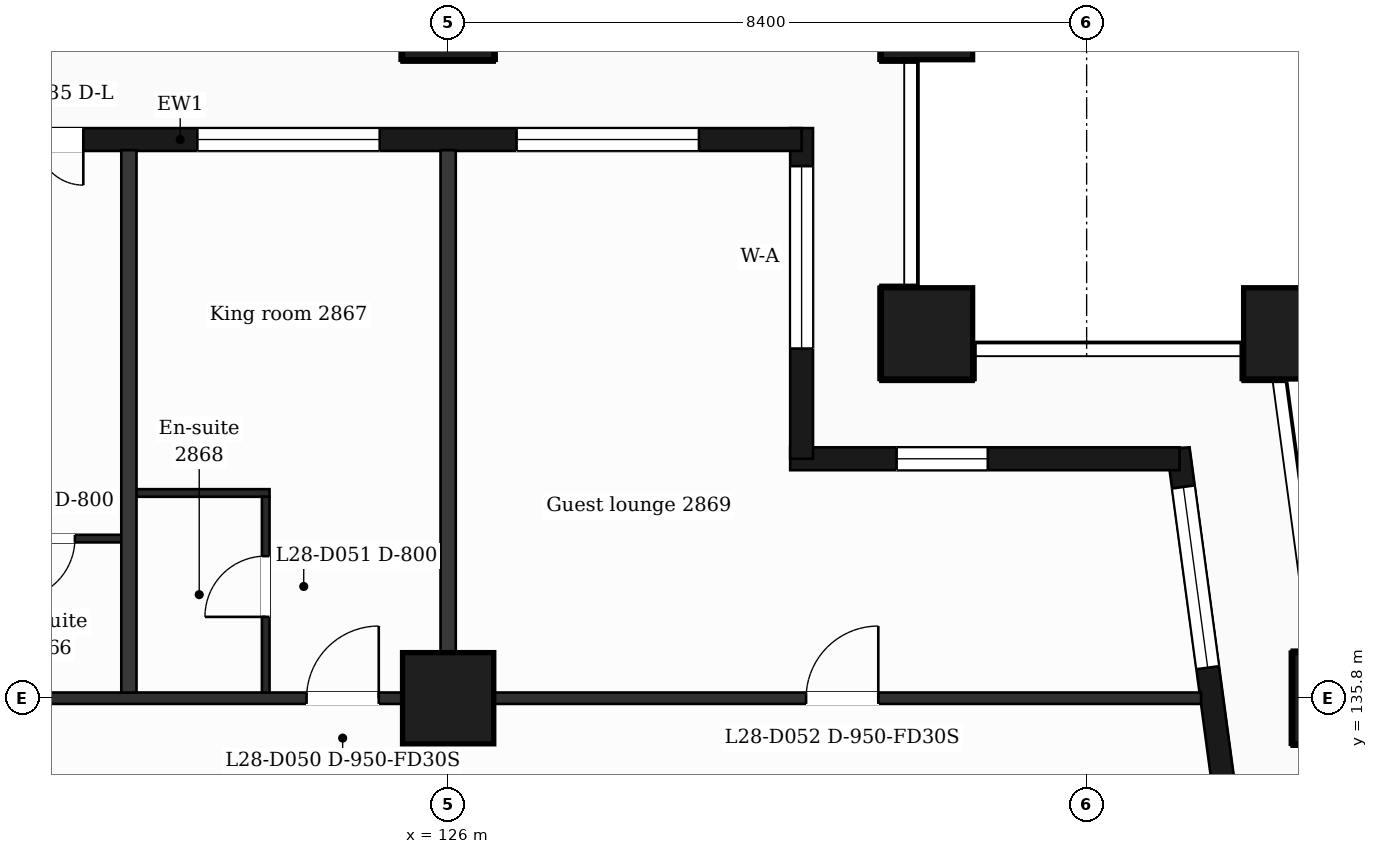
"""IFC4 building model, lengths in metres.
Left out: names, types, materials, properties, quantities, classifications, styles, units other than length and angle.
Written with IfcOpenShell. Run it as: python <this file> out.ifc"""

import sys

from ifc_helpers import new_model, si_unit, direction, frame, frame_2d, origin, origin_2d, place, context, subcontext, project, spatial, rectangle, extrude, element, fill, save


model = new_model("IFC4")
c1 = context("Model", 3, precision=1e-05, world=origin(), true_north=direction((0.0, 1.0)))
c2 = subcontext(c1, "Body", "Model", "MODEL_VIEW")
j1 = project(units=[si_unit("LENGTHUNIT", "METRE"), si_unit("PLANEANGLEUNIT", "RADIAN")], contexts=[c1])
p1 = place(None, origin())
s1 = spatial("IfcSite", under=j1, at=p1, CompositionType="ELEMENT")
p2 = place(p1, origin())
s2 = spatial("IfcBuilding", under=s1, at=p2, CompositionType="ELEMENT")
p3 = place(p2, frame((0.0, 0.0, 120.6)))
s3 = spatial("IfcBuildingStorey", under=s2, at=p3, CompositionType="ELEMENT", Elevation=120.6)
for number, where, z_axis, x_axis in (
    (1, (132.3, 140.6, 0.0), (0.0, 0.0, 1.0), (1.0, 0.0, 0.0)),
    (2, (137.065, 140.6, 0.0), (0.0, 0.0, 1.0), (1.0, 0.0, 0.0)),
    (3, (126.0, 135.8, 0.0), (0.0, 0.0, 1.0), (1.0, 0.0, 0.0)),
    (4, (137.711, 135.8, 0.0), (0.0, 0.0, 1.0), (1.0, 0.0, 0.0)),
    (5, (126.0, 144.8, 0.0), (0.0, 0.0, 1.0), (1.0, 0.0, 0.0)),
    (6, (132.3, 144.8, 0.0), (0.0, 0.0, 1.0), (1.0, 0.0, 0.0)),
):
    element("IfcColumn", number, at=place(p3, frame(where, z_axis=z_axis, x_axis=x_axis)), inside=s3, PredefinedType="COLUMN", context=c2, shape_type="SweptSolid", body=[
        extrude(rectangle(XDim=1.2, YDim=1.2, at=origin_2d()), origin(), (0.0, 0.0, 1.0), 3.7),
    ])
p4 = place(p3, frame((136.504, 132.4, 0.0), z_axis=(0.0, 0.0, 1.0), x_axis=(-0.133399697462, 0.99106231929, 0.0)))
e7 = element("IfcWall", 7, at=p4, inside=s3, PredefinedType="SOLIDWALL", context=c2, shape_type="SweptSolid", body=[
    extrude(rectangle(XDim=6.74, YDim=0.3, at=frame_2d((3.37, 0.0))), origin(), (0.0, 0.0, 1.0), 3.38),
])
p5 = place(p4, frame((1.115, 0.0, 0.0)))
e8 = element("IfcOpeningElement", 8, at=p5, cuts=e7, PredefinedType="OPENING", context=c2, shape_type="SweptSolid", body=[
    extrude(rectangle(XDim=1.2, YDim=2.4, at=frame_2d((0.6, 1.2))), frame((0.0, 0.16, 0.0), z_axis=(0.0, -1.0, 0.0), x_axis=(1.0, 0.0, 0.0)), (0.0, 0.0, 1.0), 0.32),
])
p6 = place(p4, frame((3.835, 0.0, 0.9)))
e9 = element("IfcOpeningElement", 9, at=p6, cuts=e7, PredefinedType="OPENING", context=c2, shape_type="SweptSolid", body=[
    extrude(rectangle(XDim=2.4, YDim=2.1, at=frame_2d((1.2, 1.05))), frame((0.0, 0.16, 0.0), z_axis=(0.0, -1.0, 0.0), x_axis=(1.0, 0.0, 0.0)), (0.0, 0.0, 1.0), 0.32),
])
p7 = place(p3, frame((135.623, 138.95, 0.0), z_axis=(0.0, 0.0, 1.0), x_axis=(-1.0, 0.0, 0.0)))
e10 = element("IfcWall", 10, at=p7, inside=s3, PredefinedType="SOLIDWALL", context=c2, shape_type="SweptSolid", body=[
    extrude(rectangle(XDim=5.123, YDim=0.3, at=frame_2d((2.561, 0.0))), origin(), (0.0, 0.0, 1.0), 3.38),
])
p8 = place(p7, frame((2.523, 0.0, 0.9)))
e11 = element("IfcOpeningElement", 11, at=p8, cuts=e10, PredefinedType="OPENING", context=c2, shape_type="SweptSolid", body=[
    extrude(rectangle(XDim=1.2, YDim=2.1, at=frame_2d((0.6, 1.05))), frame((0.0, 0.16, 0.0), z_axis=(0.0, -1.0, 0.0), x_axis=(1.0, 0.0, 0.0)), (0.0, 0.0, 1.0), 0.32),
])
p9 = place(p3, frame((130.65, 138.95, 0.0), z_axis=(0.0, 0.0, 1.0), x_axis=(0.0, 1.0, 0.0)))
e12 = element("IfcWall", 12, at=p9, inside=s3, PredefinedType="SOLIDWALL", context=c2, shape_type="SweptSolid", body=[
    extrude(rectangle(XDim=4.35, YDim=0.3, at=frame_2d((2.175, 0.0))), origin(), (0.0, 0.0, 1.0), 3.38),
])
p10 = place(p9, frame((1.45, 0.0, 0.9)))
e13 = element("IfcOpeningElement", 13, at=p10, cuts=e12, PredefinedType="OPENING", context=c2, shape_type="SweptSolid", body=[
    extrude(rectangle(XDim=2.4, YDim=2.1, at=frame_2d((1.2, 1.05))), frame((0.0, 0.16, 0.0), z_axis=(0.0, -1.0, 0.0), x_axis=(1.0, 0.0, 0.0)), (0.0, 0.0, 1.0), 0.32),
])
p11 = place(p3, frame((130.65, 143.15, 0.0), z_axis=(0.0, 0.0, 1.0), x_axis=(-1.0, 0.0, 0.0)))
e14 = element("IfcWall", 14, at=p11, inside=s3, PredefinedType="SOLIDWALL", context=c2, shape_type="SweptSolid", body=[
    extrude(rectangle(XDim=16.35, YDim=0.3, at=frame_2d((8.175, 0.0))), origin(), (0.0, 0.0, 1.0), 3.38),
])
p12 = place(p11, frame((1.35, 0.0, 0.9)))
e15 = element("IfcOpeningElement", 15, at=p12, cuts=e14, PredefinedType="OPENING", context=c2, shape_type="SweptSolid", body=[
    extrude(rectangle(XDim=2.4, YDim=2.1, at=frame_2d((1.2, 1.05))), frame((0.0, 0.16, 0.0), z_axis=(0.0, -1.0, 0.0), x_axis=(1.0, 0.0, 0.0)), (0.0, 0.0, 1.0), 0.32),
])
p13 = place(p11, frame((5.55, 0.0, 0.9)))
e16 = element("IfcOpeningElement", 16, at=p13, cuts=e14, PredefinedType="OPENING", context=c2, shape_type="SweptSolid", body=[
    extrude(rectangle(XDim=2.4, YDim=2.1, at=frame_2d((1.2, 1.05))), frame((0.0, 0.16, 0.0), z_axis=(0.0, -1.0, 0.0), x_axis=(1.0, 0.0, 0.0)), (0.0, 0.0, 1.0), 0.32),
])
p14 = place(p11, frame((9.45, 0.0, 0.0)))
e17 = element("IfcOpeningElement", 17, at=p14, cuts=e14, PredefinedType="OPENING", context=c2, shape_type="SweptSolid", body=[
    extrude(rectangle(XDim=1.2, YDim=2.4, at=frame_2d((0.6, 1.2))), frame((0.0, 0.16, 0.0), z_axis=(0.0, -1.0, 0.0), x_axis=(1.0, 0.0, 0.0)), (0.0, 0.0, 1.0), 0.32),
])
p15 = place(p11, frame((11.25, 0.0, 0.9)))
e18 = element("IfcOpeningElement", 18, at=p15, cuts=e14, PredefinedType="OPENING", context=c2, shape_type="SweptSolid", body=[
    extrude(rectangle(XDim=1.2, YDim=2.1, at=frame_2d((0.6, 1.05))), frame((0.0, 0.16, 0.0), z_axis=(0.0, -1.0, 0.0), x_axis=(1.0, 0.0, 0.0)), (0.0, 0.0, 1.0), 0.32),
])
p16 = place(p11, frame((13.45, 0.0, 0.9)))
e19 = element("IfcOpeningElement", 19, at=p16, cuts=e14, PredefinedType="OPENING", context=c2, shape_type="SweptSolid", body=[
    extrude(rectangle(XDim=2.4, YDim=2.1, at=frame_2d((1.2, 1.05))), frame((0.0, 0.16, 0.0), z_axis=(0.0, -1.0, 0.0), x_axis=(1.0, 0.0, 0.0)), (0.0, 0.0, 1.0), 0.32),
])
p17 = place(p3, frame((90.895, 135.8, 0.0), z_axis=(0.0, 0.0, 1.0), x_axis=(1.0, 0.0, 0.0)))
e20 = element("IfcWall", 20, at=p17, inside=s3, PredefinedType="PARTITIONING", context=c2, shape_type="SweptSolid", body=[
    extrude(rectangle(XDim=45.011, YDim=0.15, at=frame_2d((22.505, 0.0))), origin(), (0.0, 0.0, 1.0), 3.38),
])
p18 = place(p17, frame((8.005, 0.0, 0.0)))
e21 = element("IfcOpeningElement", 21, at=p18, cuts=e20, PredefinedType="OPENING", context=c2, shape_type="SweptSolid", body=[
    extrude(rectangle(XDim=1.0, YDim=2.1, at=frame_2d((0.5, 1.05))), frame((0.0, 0.085, 0.0), z_axis=(0.0, -1.0, 0.0), x_axis=(1.0, 0.0, 0.0)), (0.0, 0.0, 1.0), 0.17),
])
p19 = place(p17, frame((11.785, 0.0, 0.0)))
e22 = element("IfcOpeningElement", 22, at=p19, cuts=e20, PredefinedType="OPENING", context=c2, shape_type="SweptSolid", body=[
    extrude(rectangle(XDim=0.95, YDim=2.1, at=frame_2d((0.475, 1.05))), frame((0.0, 0.085, 0.0), z_axis=(0.0, -1.0, 0.0), x_axis=(1.0, 0.0, 0.0)), (0.0, 0.0, 1.0), 0.17),
])
p20 = place(p17, frame((14.38, 0.0, 0.0)))
e23 = element("IfcOpeningElement", 23, at=p20, cuts=e20, PredefinedType="OPENING", context=c2, shape_type="SweptSolid", body=[
    extrude(rectangle(XDim=0.95, YDim=2.1, at=frame_2d((0.475, 1.05))), frame((0.0, 0.085, 0.0), z_axis=(0.0, -1.0, 0.0), x_axis=(1.0, 0.0, 0.0)), (0.0, 0.0, 1.0), 0.17),
])
p21 = place(p17, frame((19.075, 0.0, 0.0)))
e24 = element("IfcOpeningElement", 24, at=p21, cuts=e20, PredefinedType="OPENING", context=c2, shape_type="SweptSolid", body=[
    extrude(rectangle(XDim=0.95, YDim=2.1, at=frame_2d((0.475, 1.05))), frame((0.0, 0.085, 0.0), z_axis=(0.0, -1.0, 0.0), x_axis=(1.0, 0.0, 0.0)), (0.0, 0.0, 1.0), 0.17),
])
p22 = place(p17, frame((24.855, 0.0, 0.0)))
e25 = element("IfcOpeningElement", 25, at=p22, cuts=e20, PredefinedType="OPENING", context=c2, shape_type="SweptSolid", body=[
    extrude(rectangle(XDim=1.0, YDim=2.1, at=frame_2d((0.5, 1.05))), frame((0.0, 0.085, 0.0), z_axis=(0.0, -1.0, 0.0), x_axis=(1.0, 0.0, 0.0)), (0.0, 0.0, 1.0), 0.17),
])
p23 = place(p17, frame((27.515, 0.0, 0.0)))
e26 = element("IfcOpeningElement", 26, at=p23, cuts=e20, PredefinedType="OPENING", context=c2, shape_type="SweptSolid", body=[
    extrude(rectangle(XDim=0.95, YDim=2.1, at=frame_2d((0.475, 1.05))), frame((0.0, 0.085, 0.0), z_axis=(0.0, -1.0, 0.0), x_axis=(1.0, 0.0, 0.0)), (0.0, 0.0, 1.0), 0.17),
])
p24 = place(p17, frame((33.242, 0.0, 0.0)))
e27 = element("IfcOpeningElement", 27, at=p24, cuts=e20, PredefinedType="OPENING", context=c2, shape_type="SweptSolid", body=[
    extrude(rectangle(XDim=0.95, YDim=2.1, at=frame_2d((0.475, 1.05))), frame((0.0, 0.085, 0.0), z_axis=(0.0, -1.0, 0.0), x_axis=(1.0, 0.0, 0.0)), (0.0, 0.0, 1.0), 0.17),
])
p25 = place(p17, frame((39.814, 0.0, 0.0)))
e28 = element("IfcOpeningElement", 28, at=p25, cuts=e20, PredefinedType="OPENING", context=c2, shape_type="SweptSolid", body=[
    extrude(rectangle(XDim=0.95, YDim=2.1, at=frame_2d((0.475, 1.05))), frame((0.0, 0.085, 0.0), z_axis=(0.0, -1.0, 0.0), x_axis=(1.0, 0.0, 0.0)), (0.0, 0.0, 1.0), 0.17),
])
p26 = place(p3, frame((119.65, 137.9, 0.0), z_axis=(0.0, 0.0, 1.0), x_axis=(1.0, 0.0, 0.0)))
e29 = element("IfcWall", 29, at=p26, inside=s3, PredefinedType="PARTITIONING", context=c2, shape_type="SweptSolid", body=[
    extrude(rectangle(XDim=2.15, YDim=0.1, at=frame_2d((1.075, 0.0))), origin(), (0.0, 0.0, 1.0), 3.38),
])
p27 = place(p26, frame((0.64, 0.0, 0.0)))
e30 = element("IfcOpeningElement", 30, at=p27, cuts=e29, PredefinedType="OPENING", context=c2, shape_type="SweptSolid", body=[
    extrude(rectangle(XDim=0.8, YDim=2.1, at=frame_2d((0.4, 1.05))), frame((0.0, 0.06, 0.0), z_axis=(0.0, -1.0, 0.0), x_axis=(1.0, 0.0, 0.0)), (0.0, 0.0, 1.0), 0.12),
])
p28 = place(p3, frame((121.8, 138.5, 0.0), z_axis=(0.0, 0.0, 1.0), x_axis=(1.0, 0.0, 0.0)))
e31 = element("IfcWall", 31, at=p28, inside=s3, PredefinedType="PARTITIONING", context=c2, shape_type="SweptSolid", body=[
    extrude(rectangle(XDim=1.85, YDim=0.1, at=frame_2d((0.925, 0.0))), origin(), (0.0, 0.0, 1.0), 3.38),
])
p29 = place(p3, frame((121.8, 135.875, 0.0), z_axis=(0.0, 0.0, 1.0), x_axis=(0.0, 1.0, 0.0)))
e32 = element("IfcWall", 32, at=p29, inside=s3, PredefinedType="PARTITIONING", context=c2, shape_type="SweptSolid", body=[
    extrude(rectangle(XDim=7.135, YDim=0.2, at=frame_2d((3.567, 0.0))), origin(), (0.0, 0.0, 1.0), 3.38),
])
p30 = place(p3, frame((123.6, 135.875, 0.0), z_axis=(0.0, 0.0, 1.0), x_axis=(0.0, 1.0, 0.0)))
e33 = element("IfcWall", 33, at=p30, inside=s3, PredefinedType="PARTITIONING", context=c2, shape_type="SweptSolid", body=[
    extrude(rectangle(XDim=2.575, YDim=0.1, at=frame_2d((1.288, 0.0))), origin(), (0.0, 0.0, 1.0), 3.38),
])
p31 = place(p30, frame((0.995, 0.0, 0.0)))
e34 = element("IfcOpeningElement", 34, at=p31, cuts=e33, PredefinedType="OPENING", context=c2, shape_type="SweptSolid", body=[
    extrude(rectangle(XDim=0.8, YDim=2.1, at=frame_2d((0.4, 1.05))), frame((0.0, 0.06, 0.0), z_axis=(0.0, -1.0, 0.0), x_axis=(1.0, 0.0, 0.0)), (0.0, 0.0, 1.0), 0.12),
])
p32 = place(p3, frame((126.0, 135.875, 0.0), z_axis=(0.0, 0.0, 1.0), x_axis=(0.0, 1.0, 0.0)))
e35 = element("IfcWall", 35, at=p32, inside=s3, PredefinedType="PARTITIONING", context=c2, shape_type="SweptSolid", body=[
    extrude(rectangle(XDim=7.135, YDim=0.2, at=frame_2d((3.567, 0.0))), origin(), (0.0, 0.0, 1.0), 3.38),
])
p33 = place(p6, origin())
e36 = element("IfcWindow", 36, at=p33, inside=s3, PartitioningType="SINGLE_PANEL", PredefinedType="WINDOW", context=c2, shape_type="SweptSolid", body=[
    extrude(rectangle(XDim=2.4, YDim=2.1, at=frame_2d((1.2, 1.05))), frame((0.0, 0.03, 0.0), z_axis=(0.0, -1.0, 0.0), x_axis=(1.0, 0.0, 0.0)), (0.0, 0.0, 1.0), 0.06),
])
fill(e9, e36)
p34 = place(p8, origin())
e37 = element("IfcWindow", 37, at=p34, inside=s3, PartitioningType="SINGLE_PANEL", PredefinedType="WINDOW", context=c2, shape_type="SweptSolid", body=[
    extrude(rectangle(XDim=1.2, YDim=2.1, at=frame_2d((0.6, 1.05))), frame((0.0, 0.03, 0.0), z_axis=(0.0, -1.0, 0.0), x_axis=(1.0, 0.0, 0.0)), (0.0, 0.0, 1.0), 0.06),
])
fill(e11, e37)
p35 = place(p10, origin())
e38 = element("IfcWindow", 38, at=p35, inside=s3, PartitioningType="SINGLE_PANEL", PredefinedType="WINDOW", context=c2, shape_type="SweptSolid", body=[
    extrude(rectangle(XDim=2.4, YDim=2.1, at=frame_2d((1.2, 1.05))), frame((0.0, 0.03, 0.0), z_axis=(0.0, -1.0, 0.0), x_axis=(1.0, 0.0, 0.0)), (0.0, 0.0, 1.0), 0.06),
])
fill(e13, e38)
p36 = place(p12, origin())
e39 = element("IfcWindow", 39, at=p36, inside=s3, PartitioningType="SINGLE_PANEL", PredefinedType="WINDOW", context=c2, shape_type="SweptSolid", body=[
    extrude(rectangle(XDim=2.4, YDim=2.1, at=frame_2d((1.2, 1.05))), frame((0.0, 0.03, 0.0), z_axis=(0.0, -1.0, 0.0), x_axis=(1.0, 0.0, 0.0)), (0.0, 0.0, 1.0), 0.06),
])
fill(e15, e39)
p37 = place(p13, origin())
e40 = element("IfcWindow", 40, at=p37, inside=s3, PartitioningType="SINGLE_PANEL", PredefinedType="WINDOW", context=c2, shape_type="SweptSolid", body=[
    extrude(rectangle(XDim=2.4, YDim=2.1, at=frame_2d((1.2, 1.05))), frame((0.0, 0.03, 0.0), z_axis=(0.0, -1.0, 0.0), x_axis=(1.0, 0.0, 0.0)), (0.0, 0.0, 1.0), 0.06),
])
fill(e16, e40)
p38 = place(p14, origin())
e41 = element("IfcDoor", 41, at=p38, inside=s3, OperationType="DOUBLE_DOOR_SINGLE_SWING", PredefinedType="DOOR", context=c2, shape_type="SweptSolid", body=[
    extrude(rectangle(XDim=1.2, YDim=2.4, at=frame_2d((0.6, 1.2))), frame((0.0, 0.025, 0.0), z_axis=(0.0, -1.0, 0.0), x_axis=(1.0, 0.0, 0.0)), (0.0, 0.0, 1.0), 0.05),
])
fill(e17, e41)
p39 = place(p27, origin())
e42 = element("IfcDoor", 42, at=p39, inside=s3, OperationType="SINGLE_SWING_LEFT", PredefinedType="DOOR", context=c2, shape_type="SweptSolid", body=[
    extrude(rectangle(XDim=0.8, YDim=2.1, at=frame_2d((0.4, 1.05))), frame((0.0, 0.025, 0.0), z_axis=(0.0, -1.0, 0.0), x_axis=(1.0, 0.0, 0.0)), (0.0, 0.0, 1.0), 0.05),
])
fill(e30, e42)
p40 = place(p24, origin())
e43 = element("IfcDoor", 43, at=p40, inside=s3, OperationType="SINGLE_SWING_RIGHT", PredefinedType="DOOR", context=c2, shape_type="SweptSolid", body=[
    extrude(rectangle(XDim=0.95, YDim=2.1, at=frame_2d((0.475, 1.05))), frame((0.0, 0.025, 0.0), z_axis=(0.0, -1.0, 0.0), x_axis=(1.0, 0.0, 0.0)), (0.0, 0.0, 1.0), 0.05),
])
fill(e27, e43)
p41 = place(p31, origin())
e44 = element("IfcDoor", 44, at=p41, inside=s3, OperationType="SINGLE_SWING_LEFT", PredefinedType="DOOR", context=c2, shape_type="SweptSolid", body=[
    extrude(rectangle(XDim=0.8, YDim=2.1, at=frame_2d((0.4, 1.05))), frame((0.0, 0.025, 0.0), z_axis=(0.0, -1.0, 0.0), x_axis=(1.0, 0.0, 0.0)), (0.0, 0.0, 1.0), 0.05),
])
fill(e34, e44)
p42 = place(p25, origin())
e45 = element("IfcDoor", 45, at=p42, inside=s3, OperationType="SINGLE_SWING_RIGHT", PredefinedType="DOOR", context=c2, shape_type="SweptSolid", body=[
    extrude(rectangle(XDim=0.95, YDim=2.1, at=frame_2d((0.475, 1.05))), frame((0.0, 0.025, 0.0), z_axis=(0.0, -1.0, 0.0), x_axis=(1.0, 0.0, 0.0)), (0.0, 0.0, 1.0), 0.05),
])
fill(e28, e45)
save(model, sys.argv[1])
